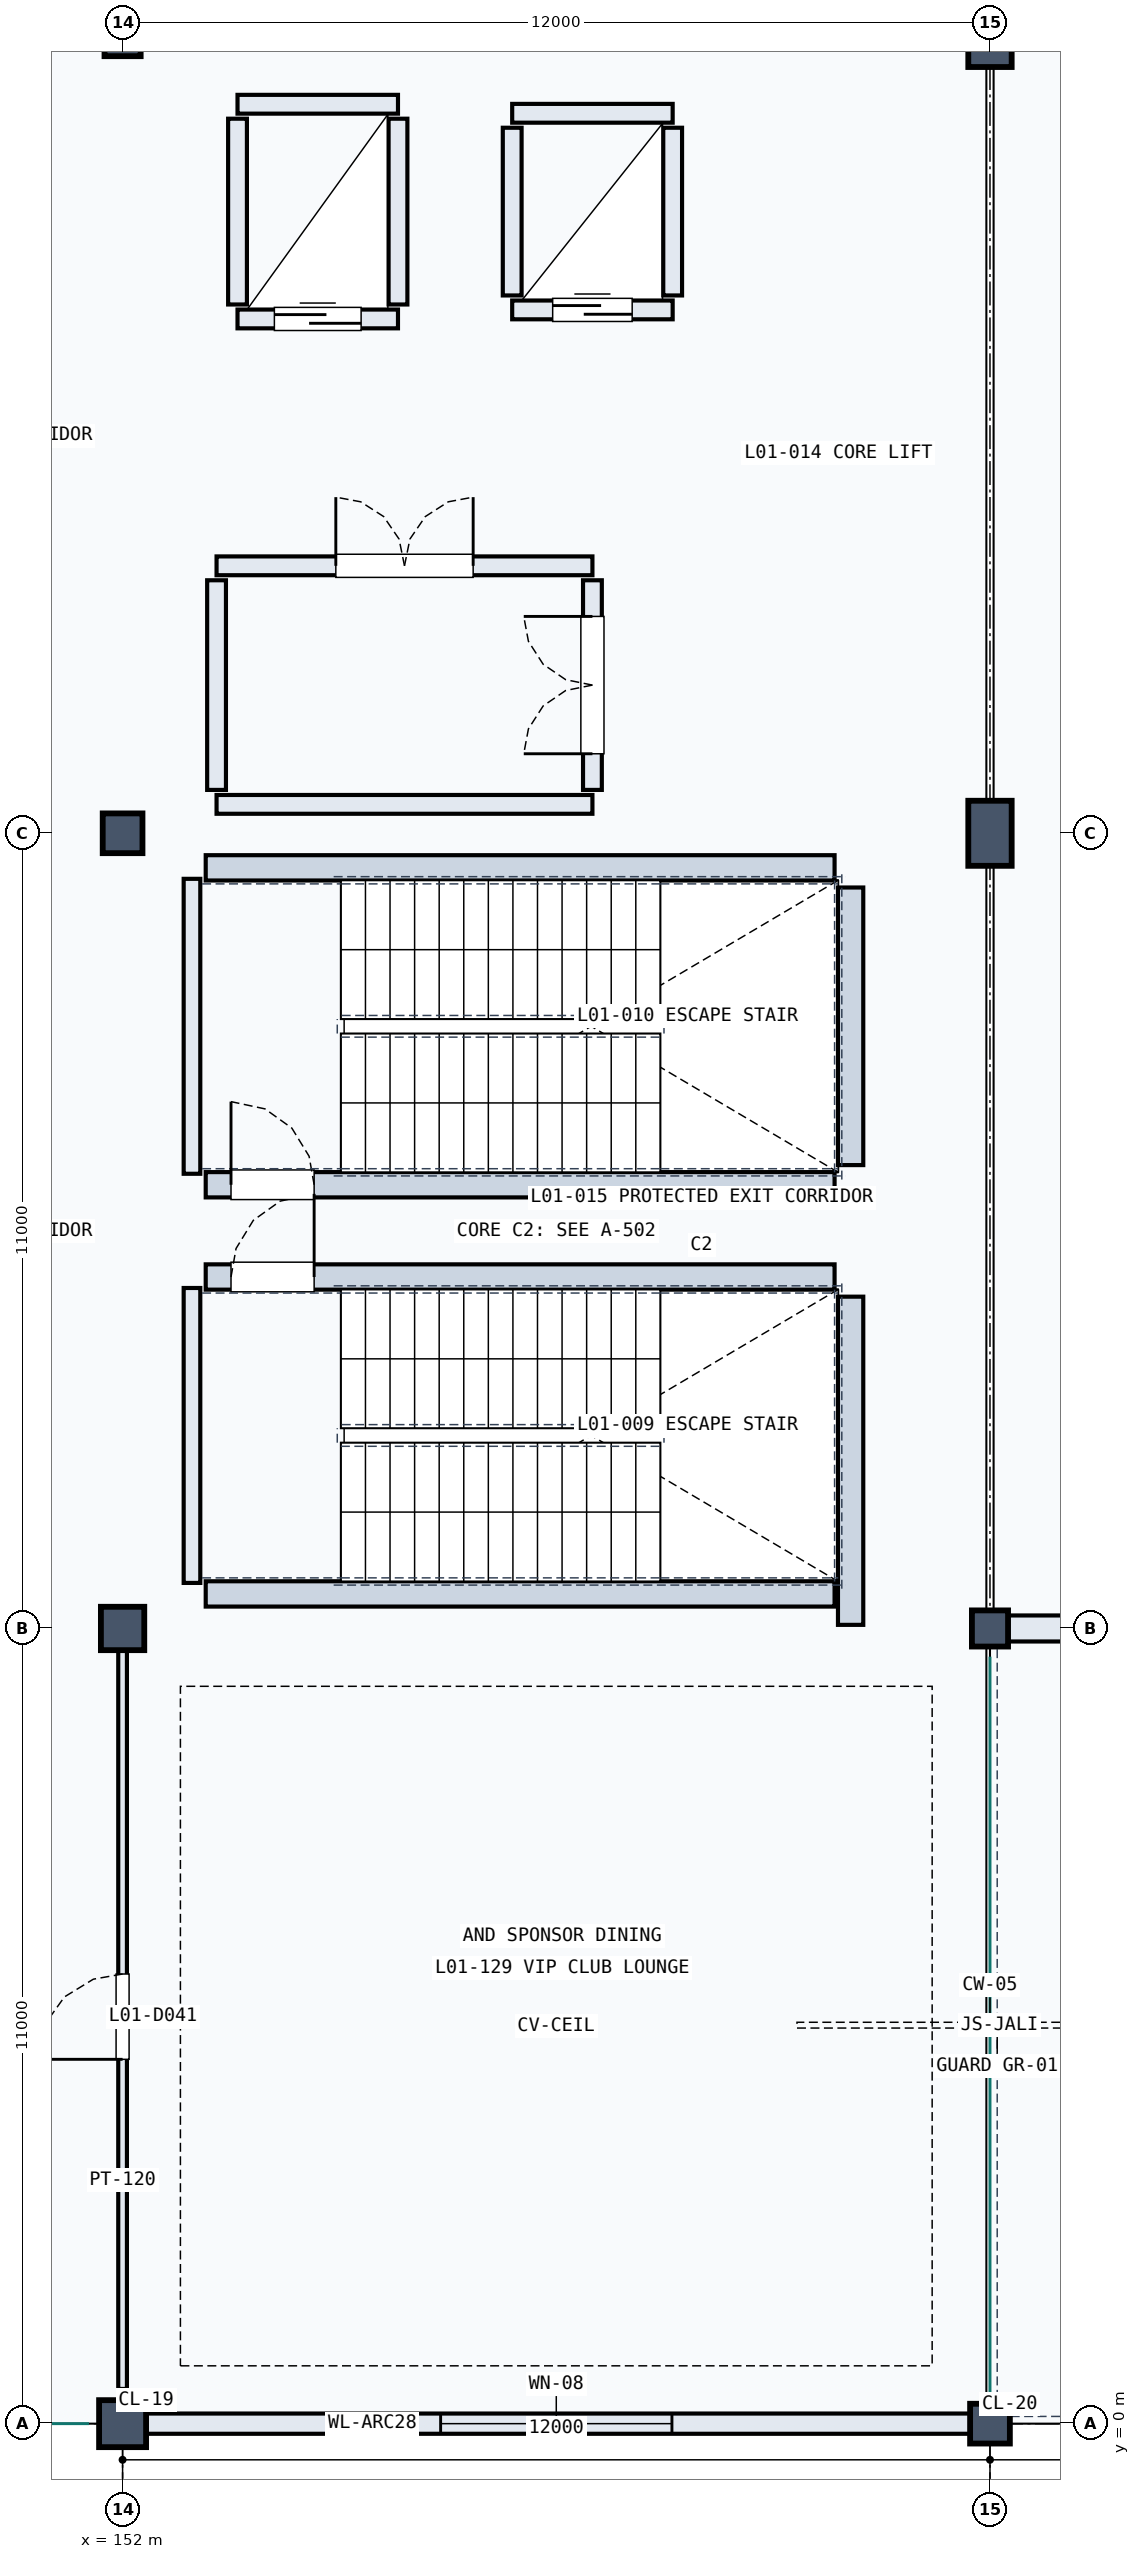
"""IFC4 building model, lengths in metres.
Left out: names, types, materials, properties, quantities, classifications, styles, units other than length and angle.
Written with IfcOpenShell. Run it as: python <this file> out.ifc"""

import sys

from ifc_helpers import new_model, si_unit, direction, frame, frame_2d, origin, origin_2d, place, context, subcontext, project, spatial, rectangle, circle, extrude, element, fill, save


model = new_model("IFC4")
c1 = context("Model", 3, precision=1e-05, world=origin(), true_north=direction((0.0, 1.0)))
c2 = subcontext(c1, "Body", "Model", "MODEL_VIEW")
j1 = project(units=[si_unit("LENGTHUNIT", "METRE"), si_unit("PLANEANGLEUNIT", "RADIAN")], contexts=[c1])
p1 = place(None, origin())
s1 = spatial("IfcSite", under=j1, at=p1, CompositionType="ELEMENT")
p2 = place(p1, origin())
s2 = spatial("IfcBuilding", under=s1, at=p2, CompositionType="ELEMENT")
p3 = place(p2, frame((0.0, 0.0, 5.4)))
s3 = spatial("IfcBuildingStorey", under=s2, at=p3, CompositionType="ELEMENT", Elevation=5.4)
p4 = place(p3, frame((152.0, 0.0, 0.0), z_axis=(0.0, 0.0, 1.0), x_axis=(1.0, 0.0, 0.0)))
e1 = element("IfcColumn", 1, at=p4, inside=s3, PredefinedType="COLUMN", context=c2, shape_type="SweptSolid", body=[
    extrude(circle(Radius=0.325, at=origin_2d()), origin(), (0.0, 0.0, 1.0), 4.8),
])
p5 = place(p3, frame((152.0, 11.0, 0.0), z_axis=(0.0, 0.0, 1.0), x_axis=(1.0, 0.0, 0.0)))
e2 = element("IfcColumn", 2, at=p5, inside=s3, PredefinedType="COLUMN", context=c2, shape_type="SweptSolid", body=[
    extrude(rectangle(XDim=0.6, YDim=0.6, at=origin_2d()), origin(), (0.0, 0.0, 1.0), 4.8),
])
p6 = place(p3, frame((152.0, 22.0, 0.0), z_axis=(0.0, 0.0, 1.0), x_axis=(1.0, 0.0, 0.0)))
e3 = element("IfcColumn", 3, at=p6, inside=s3, PredefinedType="COLUMN", context=c2, shape_type="SweptSolid", body=[
    extrude(rectangle(XDim=0.55, YDim=0.55, at=origin_2d()), origin(), (0.0, 0.0, 1.0), 4.8),
])
p7 = place(p3, frame((152.0, 33.0, 0.0), z_axis=(0.0, 0.0, 1.0), x_axis=(1.0, 0.0, 0.0)))
e4 = element("IfcColumn", 4, at=p7, inside=s3, PredefinedType="COLUMN", context=c2, shape_type="SweptSolid", body=[
    extrude(rectangle(XDim=0.5, YDim=0.5, at=origin_2d()), origin(), (0.0, 0.0, 1.0), 4.8),
])
p8 = place(p3, frame((164.0, 0.0, 0.0), z_axis=(0.0, 0.0, 1.0), x_axis=(1.0, 0.0, 0.0)))
e5 = element("IfcColumn", 5, at=p8, inside=s3, PredefinedType="COLUMN", context=c2, shape_type="SweptSolid", body=[
    extrude(circle(Radius=0.275, at=origin_2d()), origin(), (0.0, 0.0, 1.0), 4.8),
])
p9 = place(p3, frame((164.0, 11.0, 0.0), z_axis=(0.0, 0.0, 1.0), x_axis=(1.0, 0.0, 0.0)))
e6 = element("IfcColumn", 6, at=p9, inside=s3, PredefinedType="COLUMN", context=c2, shape_type="SweptSolid", body=[
    extrude(rectangle(XDim=0.5, YDim=0.5, at=origin_2d()), origin(), (0.0, 0.0, 1.0), 4.8),
])
p10 = place(p3, frame((164.0, 22.0, 0.0), z_axis=(0.0, 0.0, 1.0), x_axis=(1.0, 0.0, 0.0)))
e7 = element("IfcColumn", 7, at=p10, inside=s3, PredefinedType="COLUMN", context=c2, shape_type="SweptSolid", body=[
    extrude(rectangle(XDim=0.6, YDim=0.9, at=origin_2d()), origin(), (0.0, 0.0, 1.0), 4.8),
])
p11 = place(p3, frame((164.0, 33.0, 0.0), z_axis=(0.0, 0.0, 1.0), x_axis=(1.0, 0.0, 0.0)))
e8 = element("IfcColumn", 8, at=p11, inside=s3, PredefinedType="COLUMN", context=c2, shape_type="SweptSolid", body=[
    extrude(rectangle(XDim=0.6, YDim=0.8, at=origin_2d()), origin(), (0.0, 0.0, 1.0), 4.8),
])
p12 = place(p3, frame((152.22, 0.0, 0.0), z_axis=(0.0, 0.0, 1.0), x_axis=(1.0, 0.0, 0.0)))
e9 = element("IfcWall", 9, at=p12, inside=s3, PredefinedType="SOLIDWALL", context=c2, shape_type="SweptSolid", body=[
    extrude(rectangle(XDim=11.56, YDim=0.28, at=frame_2d((5.78, 0.0))), origin(), (0.0, 0.0, 1.0), 3.79),
])
p13 = place(p12, frame((4.18, 0.0, 1.1)))
e10 = element("IfcOpeningElement", 10, at=p13, cuts=e9, PredefinedType="OPENING", context=c2, shape_type="SweptSolid", body=[
    extrude(rectangle(XDim=3.2, YDim=1.4, at=frame_2d((1.6, 0.7))), frame((0.0, 0.15, 0.0), z_axis=(0.0, -1.0, 0.0), x_axis=(1.0, 0.0, 0.0)), (0.0, 0.0, 1.0), 0.3),
])
p14 = place(p3, frame((164.21, 11.0, 0.0), z_axis=(0.0, 0.0, 1.0), x_axis=(1.0, 0.0, 0.0)))
e11 = element("IfcWall", 11, at=p14, inside=s3, PredefinedType="SOLIDWALL", context=c2, shape_type="SweptSolid", body=[
    extrude(rectangle(XDim=11.57, YDim=0.36, at=frame_2d((5.785, 0.0))), origin(), (0.0, 0.0, 1.0), 3.49),
])
p15 = place(p14, frame((4.96, 0.0, 0.0)))
e12 = element("IfcOpeningElement", 12, at=p15, cuts=e11, PredefinedType="OPENING", context=c2, shape_type="SweptSolid", body=[
    extrude(rectangle(XDim=1.65, YDim=2.3, at=frame_2d((0.825, 1.15))), frame((0.0, 0.19, 0.0), z_axis=(0.0, -1.0, 0.0), x_axis=(1.0, 0.0, 0.0)), (0.0, 0.0, 1.0), 0.38),
])
p16 = place(p14, frame((3.166, 0.0, 0.8)))
e13 = element("IfcOpeningElement", 13, at=p16, cuts=e11, PredefinedType="OPENING", context=c2, shape_type="SweptSolid", body=[
    extrude(rectangle(XDim=0.9, YDim=1.8, at=frame_2d((0.45, 0.9))), frame((0.0, 0.19, 0.0), z_axis=(0.0, -1.0, 0.0), x_axis=(1.0, 0.0, 0.0)), (0.0, 0.0, 1.0), 0.38),
])
p17 = place(p3, frame((152.96, 11.63, 0.0), z_axis=(0.0, 0.0, 1.0), x_axis=(0.0, 1.0, 0.0)))
e14 = element("IfcWall", 14, at=p17, inside=s3, PredefinedType="SOLIDWALL", context=c2, shape_type="SweptSolid", body=[
    extrude(rectangle(XDim=4.08, YDim=0.23, at=frame_2d((2.04, 0.0))), origin(), (0.0, 0.0, 1.0), 4.46),
])
p18 = place(p3, frame((162.072, 11.05, 0.0), z_axis=(0.0, 0.0, 1.0), x_axis=(0.0, 1.0, 0.0)))
e15 = element("IfcWall", 15, at=p18, inside=s3, PredefinedType="SOLIDWALL", context=c2, shape_type="SweptSolid", body=[
    extrude(rectangle(XDim=4.54, YDim=0.35, at=frame_2d((2.27, 0.0))), origin(), (0.0, 0.0, 1.0), 4.46),
])
p19 = place(p3, frame((153.15, 11.478, 0.0), z_axis=(0.0, 0.0, 1.0), x_axis=(1.0, 0.0, 0.0)))
e16 = element("IfcWall", 16, at=p19, inside=s3, PredefinedType="SOLIDWALL", context=c2, shape_type="SweptSolid", body=[
    extrude(rectangle(XDim=8.7, YDim=0.35, at=frame_2d((4.35, 0.0))), origin(), (0.0, 0.0, 1.0), 4.46),
])
p20 = place(p3, frame((153.15, 15.862, 0.0), z_axis=(0.0, 0.0, 1.0), x_axis=(1.0, 0.0, 0.0)))
e17 = element("IfcWall", 17, at=p20, inside=s3, PredefinedType="SOLIDWALL", context=c2, shape_type="SweptSolid", body=[
    extrude(rectangle(XDim=8.7, YDim=0.35, at=frame_2d((4.35, 0.0))), origin(), (0.0, 0.0, 1.0), 4.46),
])
p21 = place(p20, frame((0.35, 0.0, 0.0)))
e18 = element("IfcOpeningElement", 18, at=p21, cuts=e17, PredefinedType="OPENING", context=c2, shape_type="SweptSolid", body=[
    extrude(rectangle(XDim=1.15, YDim=2.2, at=frame_2d((0.575, 1.1))), frame((0.0, 0.185, 0.0), z_axis=(0.0, -1.0, 0.0), x_axis=(1.0, 0.0, 0.0)), (0.0, 0.0, 1.0), 0.37),
])
p22 = place(p3, frame((152.96, 17.29, 0.0), z_axis=(0.0, 0.0, 1.0), x_axis=(0.0, 1.0, 0.0)))
e19 = element("IfcWall", 19, at=p22, inside=s3, PredefinedType="SOLIDWALL", context=c2, shape_type="SweptSolid", body=[
    extrude(rectangle(XDim=4.08, YDim=0.23, at=frame_2d((2.04, 0.0))), origin(), (0.0, 0.0, 1.0), 4.46),
])
p23 = place(p3, frame((162.072, 17.41, 0.0), z_axis=(0.0, 0.0, 1.0), x_axis=(0.0, 1.0, 0.0)))
e20 = element("IfcWall", 20, at=p23, inside=s3, PredefinedType="SOLIDWALL", context=c2, shape_type="SweptSolid", body=[
    extrude(rectangle(XDim=3.84, YDim=0.35, at=frame_2d((1.92, 0.0))), origin(), (0.0, 0.0, 1.0), 4.46),
])
p24 = place(p3, frame((153.15, 17.138, 0.0), z_axis=(0.0, 0.0, 1.0), x_axis=(1.0, 0.0, 0.0)))
e21 = element("IfcWall", 21, at=p24, inside=s3, PredefinedType="SOLIDWALL", context=c2, shape_type="SweptSolid", body=[
    extrude(rectangle(XDim=8.7, YDim=0.35, at=frame_2d((4.35, 0.0))), origin(), (0.0, 0.0, 1.0), 4.46),
])
p25 = place(p24, frame((0.35, 0.0, 0.0)))
e22 = element("IfcOpeningElement", 22, at=p25, cuts=e21, PredefinedType="OPENING", context=c2, shape_type="SweptSolid", body=[
    extrude(rectangle(XDim=1.15, YDim=2.2, at=frame_2d((0.575, 1.1))), frame((0.0, 0.185, 0.0), z_axis=(0.0, -1.0, 0.0), x_axis=(1.0, 0.0, 0.0)), (0.0, 0.0, 1.0), 0.37),
])
p26 = place(p3, frame((153.15, 21.522, 0.0), z_axis=(0.0, 0.0, 1.0), x_axis=(1.0, 0.0, 0.0)))
e23 = element("IfcWall", 23, at=p26, inside=s3, PredefinedType="SOLIDWALL", context=c2, shape_type="SweptSolid", body=[
    extrude(rectangle(XDim=8.7, YDim=0.35, at=frame_2d((4.35, 0.0))), origin(), (0.0, 0.0, 1.0), 4.46),
])
p27 = place(p3, frame((153.59, 29.115, 0.0), z_axis=(0.0, 0.0, 1.0), x_axis=(1.0, 0.0, 0.0)))
e24 = element("IfcWall", 24, at=p27, inside=s3, PredefinedType="SOLIDWALL", context=c2, shape_type="SweptSolid", body=[
    extrude(rectangle(XDim=2.22, YDim=0.26, at=frame_2d((1.11, 0.0))), origin(), (0.0, 0.0, 1.0), 4.46),
])
p28 = place(p27, frame((0.51, 0.0, 0.0)))
e25 = element("IfcOpeningElement", 25, at=p28, cuts=e24, PredefinedType="OPENING", context=c2, shape_type="SweptSolid", body=[
    extrude(rectangle(XDim=1.2, YDim=2.2, at=frame_2d((0.6, 1.1))), frame((0.0, 0.14, 0.0), z_axis=(0.0, -1.0, 0.0), x_axis=(1.0, 0.0, 0.0)), (0.0, 0.0, 1.0), 0.28),
])
p29 = place(p3, frame((153.59, 32.085, 0.0), z_axis=(0.0, 0.0, 1.0), x_axis=(1.0, 0.0, 0.0)))
e26 = element("IfcWall", 26, at=p29, inside=s3, PredefinedType="SOLIDWALL", context=c2, shape_type="SweptSolid", body=[
    extrude(rectangle(XDim=2.22, YDim=0.26, at=frame_2d((1.11, 0.0))), origin(), (0.0, 0.0, 1.0), 4.46),
])
for number, where, z_axis, x_axis in (
    (27, (153.59, 29.315, 0.0), (0.0, 0.0, 1.0), (0.0, 1.0, 0.0)),
    (28, (155.81, 29.315, 0.0), (0.0, 0.0, 1.0), (0.0, 1.0, 0.0)),
):
    element("IfcWall", number, at=place(p3, frame(where, z_axis=z_axis, x_axis=x_axis)), inside=s3, PredefinedType="SOLIDWALL", context=c2, shape_type="SweptSolid", body=[
        extrude(rectangle(XDim=2.57, YDim=0.26, at=frame_2d((1.285, 0.0))), origin(), (0.0, 0.0, 1.0), 4.46),
    ])
p30 = place(p3, frame((157.39, 29.24, 0.0), z_axis=(0.0, 0.0, 1.0), x_axis=(1.0, 0.0, 0.0)))
e29 = element("IfcWall", 29, at=p30, inside=s3, PredefinedType="SOLIDWALL", context=c2, shape_type="SweptSolid", body=[
    extrude(rectangle(XDim=2.22, YDim=0.26, at=frame_2d((1.11, 0.0))), origin(), (0.0, 0.0, 1.0), 4.46),
])
p31 = place(p30, frame((0.56, 0.0, 0.0)))
e30 = element("IfcOpeningElement", 30, at=p31, cuts=e29, PredefinedType="OPENING", context=c2, shape_type="SweptSolid", body=[
    extrude(rectangle(XDim=1.1, YDim=2.15, at=frame_2d((0.55, 1.075))), frame((0.0, 0.14, 0.0), z_axis=(0.0, -1.0, 0.0), x_axis=(1.0, 0.0, 0.0)), (0.0, 0.0, 1.0), 0.28),
])
p32 = place(p3, frame((157.39, 31.96, 0.0), z_axis=(0.0, 0.0, 1.0), x_axis=(1.0, 0.0, 0.0)))
e31 = element("IfcWall", 31, at=p32, inside=s3, PredefinedType="SOLIDWALL", context=c2, shape_type="SweptSolid", body=[
    extrude(rectangle(XDim=2.22, YDim=0.26, at=frame_2d((1.11, 0.0))), origin(), (0.0, 0.0, 1.0), 4.46),
])
for number, where, z_axis, x_axis in (
    (32, (157.39, 29.44, 0.0), (0.0, 0.0, 1.0), (0.0, 1.0, 0.0)),
    (33, (159.61, 29.44, 0.0), (0.0, 0.0, 1.0), (0.0, 1.0, 0.0)),
):
    element("IfcWall", number, at=place(p3, frame(where, z_axis=z_axis, x_axis=x_axis)), inside=s3, PredefinedType="SOLIDWALL", context=c2, shape_type="SweptSolid", body=[
        extrude(rectangle(XDim=2.32, YDim=0.26, at=frame_2d((1.16, 0.0))), origin(), (0.0, 0.0, 1.0), 4.46),
    ])
p33 = place(p3, frame((153.3, 25.7, 0.0), z_axis=(0.0, 0.0, 1.0), x_axis=(1.0, 0.0, 0.0)))
e34 = element("IfcWall", 34, at=p33, inside=s3, PredefinedType="SOLIDWALL", context=c2, shape_type="SweptSolid", body=[
    extrude(rectangle(XDim=5.2, YDim=0.26, at=frame_2d((2.6, 0.0))), origin(), (0.0, 0.0, 1.0), 4.46),
])
p34 = place(p33, frame((1.65, 0.0, 0.0)))
e35 = element("IfcOpeningElement", 35, at=p34, cuts=e34, PredefinedType="OPENING", context=c2, shape_type="SweptSolid", body=[
    extrude(rectangle(XDim=1.9, YDim=2.2, at=frame_2d((0.95, 1.1))), frame((0.0, 0.14, 0.0), z_axis=(0.0, -1.0, 0.0), x_axis=(1.0, 0.0, 0.0)), (0.0, 0.0, 1.0), 0.28),
])
p35 = place(p3, frame((153.3, 22.4, 0.0), z_axis=(0.0, 0.0, 1.0), x_axis=(1.0, 0.0, 0.0)))
e36 = element("IfcWall", 36, at=p35, inside=s3, PredefinedType="SOLIDWALL", context=c2, shape_type="SweptSolid", body=[
    extrude(rectangle(XDim=5.2, YDim=0.26, at=frame_2d((2.6, 0.0))), origin(), (0.0, 0.0, 1.0), 3.77),
])
p36 = place(p3, frame((153.3, 22.6, 0.0), z_axis=(0.0, 0.0, 1.0), x_axis=(0.0, 1.0, 0.0)))
e37 = element("IfcWall", 37, at=p36, inside=s3, PredefinedType="SOLIDWALL", context=c2, shape_type="SweptSolid", body=[
    extrude(rectangle(XDim=2.9, YDim=0.26, at=frame_2d((1.45, 0.0))), origin(), (0.0, 0.0, 1.0), 4.46),
])
p37 = place(p3, frame((158.5, 22.6, 0.0), z_axis=(0.0, 0.0, 1.0), x_axis=(0.0, 1.0, 0.0)))
e38 = element("IfcWall", 38, at=p37, inside=s3, PredefinedType="SOLIDWALL", context=c2, shape_type="SweptSolid", body=[
    extrude(rectangle(XDim=2.9, YDim=0.26, at=frame_2d((1.45, 0.0))), origin(), (0.0, 0.0, 1.0), 4.46),
])
p38 = place(p37, frame((0.5, 0.0, 0.0)))
e39 = element("IfcOpeningElement", 39, at=p38, cuts=e38, PredefinedType="OPENING", context=c2, shape_type="SweptSolid", body=[
    extrude(rectangle(XDim=1.9, YDim=2.2, at=frame_2d((0.95, 1.1))), frame((0.0, 0.14, 0.0), z_axis=(0.0, -1.0, 0.0), x_axis=(1.0, 0.0, 0.0)), (0.0, 0.0, 1.0), 0.28),
])
p39 = place(p3, frame((152.0, 0.48, 0.0), z_axis=(0.0, 0.0, 1.0), x_axis=(0.0, 1.0, 0.0)))
e40 = element("IfcWall", 40, at=p39, inside=s3, PredefinedType="PARTITIONING", context=c2, shape_type="SweptSolid", body=[
    extrude(rectangle(XDim=10.3, YDim=0.12, at=frame_2d((5.15, 0.0))), origin(), (0.0, 0.0, 1.0), 3.69),
])
p40 = place(p39, frame((4.56, 0.0, 0.0)))
e41 = element("IfcOpeningElement", 41, at=p40, cuts=e40, PredefinedType="OPENING", context=c2, shape_type="SweptSolid", body=[
    extrude(rectangle(XDim=1.18, YDim=2.15, at=frame_2d((0.59, 1.075))), frame((0.0, 0.07, 0.0), z_axis=(0.0, -1.0, 0.0), x_axis=(1.0, 0.0, 0.0)), (0.0, 0.0, 1.0), 0.14),
])
p41 = place(p13, origin())
e42 = element("IfcWindow", 42, at=p41, inside=s3, PartitioningType="SINGLE_PANEL", PredefinedType="WINDOW", context=c2, shape_type="SweptSolid", body=[
    extrude(rectangle(XDim=3.2, YDim=1.4, at=frame_2d((1.6, 0.7))), frame((0.0, 0.03, 0.0), z_axis=(0.0, -1.0, 0.0), x_axis=(1.0, 0.0, 0.0)), (0.0, 0.0, 1.0), 0.06),
])
fill(e10, e42)
p42 = place(p21, origin())
e43 = element("IfcDoor", 43, at=p42, inside=s3, OperationType="SINGLE_SWING_RIGHT", PredefinedType="DOOR", context=c2, shape_type="SweptSolid", body=[
    extrude(rectangle(XDim=1.15, YDim=2.2, at=frame_2d((0.575, 1.1))), frame((0.0, 0.025, 0.0), z_axis=(0.0, -1.0, 0.0), x_axis=(1.0, 0.0, 0.0)), (0.0, 0.0, 1.0), 0.05),
])
fill(e18, e43)
p43 = place(p25, origin())
e44 = element("IfcDoor", 44, at=p43, inside=s3, OperationType="SINGLE_SWING_LEFT", PredefinedType="DOOR", context=c2, shape_type="SweptSolid", body=[
    extrude(rectangle(XDim=1.15, YDim=2.2, at=frame_2d((0.575, 1.1))), frame((0.0, 0.025, 0.0), z_axis=(0.0, -1.0, 0.0), x_axis=(1.0, 0.0, 0.0)), (0.0, 0.0, 1.0), 0.05),
])
fill(e22, e44)
p44 = place(p28, origin())
e45 = element("IfcDoor", 45, at=p44, inside=s3, OperationType="SLIDING_TO_LEFT", PredefinedType="DOOR", context=c2, shape_type="SweptSolid", body=[
    extrude(rectangle(XDim=1.2, YDim=2.2, at=frame_2d((0.6, 1.1))), frame((0.0, 0.025, 0.0), z_axis=(0.0, -1.0, 0.0), x_axis=(1.0, 0.0, 0.0)), (0.0, 0.0, 1.0), 0.05),
])
fill(e25, e45)
p45 = place(p31, origin())
e46 = element("IfcDoor", 46, at=p45, inside=s3, OperationType="SLIDING_TO_LEFT", PredefinedType="DOOR", context=c2, shape_type="SweptSolid", body=[
    extrude(rectangle(XDim=1.1, YDim=2.15, at=frame_2d((0.55, 1.075))), frame((0.0, 0.025, 0.0), z_axis=(0.0, -1.0, 0.0), x_axis=(1.0, 0.0, 0.0)), (0.0, 0.0, 1.0), 0.05),
])
fill(e30, e46)
p46 = place(p34, origin())
e47 = element("IfcDoor", 47, at=p46, inside=s3, OperationType="DOUBLE_DOOR_SINGLE_SWING", PredefinedType="DOOR", context=c2, shape_type="SweptSolid", body=[
    extrude(rectangle(XDim=1.9, YDim=2.2, at=frame_2d((0.95, 1.1))), frame((0.0, 0.025, 0.0), z_axis=(0.0, -1.0, 0.0), x_axis=(1.0, 0.0, 0.0)), (0.0, 0.0, 1.0), 0.05),
])
fill(e35, e47)
p47 = place(p38, origin())
e48 = element("IfcDoor", 48, at=p47, inside=s3, OperationType="DOUBLE_DOOR_SINGLE_SWING", PredefinedType="DOOR", context=c2, shape_type="SweptSolid", body=[
    extrude(rectangle(XDim=1.9, YDim=2.2, at=frame_2d((0.95, 1.1))), frame((0.0, 0.025, 0.0), z_axis=(0.0, -1.0, 0.0), x_axis=(1.0, 0.0, 0.0)), (0.0, 0.0, 1.0), 0.05),
])
fill(e39, e48)
p48 = place(p40, origin())
e49 = element("IfcDoor", 49, at=p48, inside=s3, OperationType="SINGLE_SWING_LEFT", PredefinedType="DOOR", context=c2, shape_type="SweptSolid", body=[
    extrude(rectangle(XDim=1.18, YDim=2.15, at=frame_2d((0.59, 1.075))), frame((0.0, 0.025, 0.0), z_axis=(0.0, -1.0, 0.0), x_axis=(1.0, 0.0, 0.0)), (0.0, 0.0, 1.0), 0.05),
])
fill(e41, e49)
save(model, sys.argv[1])
